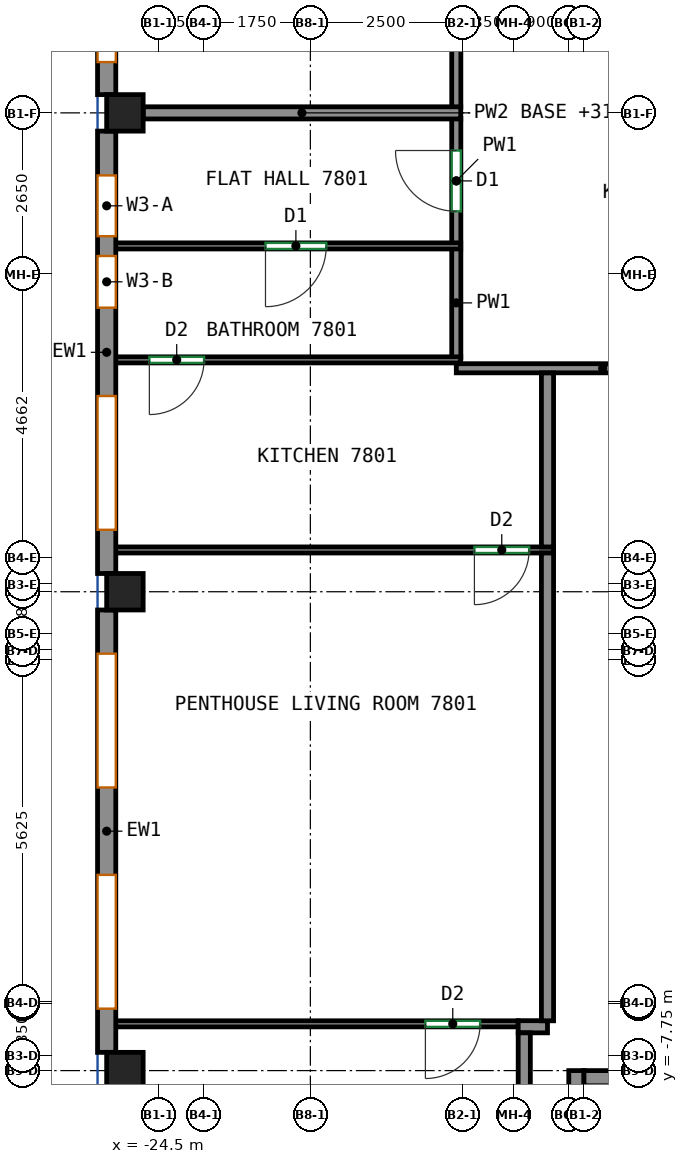
"""IFC4 building model, lengths in metres.
Left out: names, types, materials, properties, quantities, classifications, styles, units other than length and angle.
Written with IfcOpenShell. Run it as: python <this file> out.ifc"""

import sys

from ifc_helpers import new_model, si_unit, direction, frame, frame_2d, origin, origin_2d, place, context, subcontext, project, spatial, rectangle, extrude, source, transform, mapped, element, fill, save


model = new_model("IFC4")
c1 = context("Model", 3, precision=1e-05, world=origin(), true_north=direction((0.0, 1.0)))
c2 = subcontext(c1, "Body", "Model", "MODEL_VIEW")
j1 = project(units=[si_unit("LENGTHUNIT", "METRE"), si_unit("PLANEANGLEUNIT", "RADIAN")], contexts=[c1])
p1 = place(None, origin())
s1 = spatial("IfcSite", under=j1, at=p1, CompositionType="ELEMENT")
p2 = place(p1, origin())
s2 = spatial("IfcBuilding", under=s1, at=p2, CompositionType="ELEMENT")
p3 = place(p2, frame((0.0, 0.0, 312.0)))
s3 = spatial("IfcBuildingStorey", under=s2, at=p3, CompositionType="ELEMENT", Elevation=312.0)
m1 = source(origin(), c2, "Body", "SweptSolid", [
    extrude(rectangle(XDim=0.6, YDim=0.6, at=origin_2d()), origin(), (0.0, 0.0, 1.0), 3.12),
])
for number, where, z_axis, x_axis in (
    (1, (-25.05, -7.75, 0.0), (0.0, 0.0, 1.0), (1.0, 0.0, 0.0)),
    (2, (-25.05, 0.125, 0.0), (0.0, 0.0, 1.0), (1.0, 0.0, 0.0)),
    (3, (-25.05, 8.0, 0.0), (0.0, 0.0, 1.0), (1.0, 0.0, 0.0)),
):
    element("IfcColumn", number, at=place(p3, frame(where, z_axis=z_axis, x_axis=x_axis)), inside=s3, PredefinedType="COLUMN", context=c2, shape_type="MappedRepresentation", body=[
        mapped(m1, transform((0.0, 0.0, 0.0))),
    ])
m2 = source(origin(), c2, "Body", "SweptSolid", [
    extrude(rectangle(XDim=8.0, YDim=0.25, at=frame_2d((4.0, 0.0))), origin(), (0.0, 0.0, 1.0), 3.12),
])
p4 = place(p3, frame((-17.625, -15.75, 0.0), z_axis=(0.0, 0.0, 1.0), x_axis=(0.0, 1.0, 0.0)))
e4 = element("IfcWall", 4, at=p4, inside=s3, PredefinedType="SHEAR", context=c2, shape_type="MappedRepresentation", body=[
    mapped(m2, transform((0.0, 0.0, 0.0))),
])
m3 = source(origin(), c2, "Body", "SweptSolid", [
    extrude(rectangle(XDim=3.7, YDim=0.25, at=frame_2d((1.85, 0.0))), origin(), (0.0, 0.0, 1.0), 3.12),
])
p5 = place(p3, frame((-17.5, -7.875, 0.0), z_axis=(0.0, 0.0, 1.0), x_axis=(1.0, 0.0, 0.0)))
e5 = element("IfcWall", 5, at=p5, inside=s3, PredefinedType="SHEAR", context=c2, shape_type="MappedRepresentation", body=[
    mapped(m3, transform((0.0, 0.0, 0.0))),
])
m4 = source(origin(), c2, "Body", "SweptSolid", [
    extrude(rectangle(XDim=13.082, YDim=0.3, at=frame_2d((6.541, 0.0))), origin(), (0.0, 0.0, 1.0), 3.12),
])
p6 = place(p3, frame((-25.35, 21.382, 0.0), z_axis=(0.0, 0.0, 1.0), x_axis=(0.0, -1.0, 0.0)))
e6 = element("IfcWall", 6, at=p6, inside=s3, PredefinedType="SOLIDWALL", context=c2, shape_type="MappedRepresentation", body=[
    mapped(m4, transform((0.0, 0.0, 0.0))),
])
p7 = place(p6, frame((0.535, 0.0, 0.8)))
e7 = element("IfcOpeningElement", 7, at=p7, cuts=e6, PredefinedType="OPENING", context=c2, shape_type="SweptSolid", body=[
    extrude(rectangle(XDim=2.2, YDim=2.05, at=frame_2d((1.1, 1.025))), frame((0.0, 0.16, 0.0), z_axis=(0.0, -1.0, 0.0), x_axis=(1.0, 0.0, 0.0)), (0.0, 0.0, 1.0), 0.32),
])
p8 = place(p6, frame((3.806, 0.0, 0.8)))
e8 = element("IfcOpeningElement", 8, at=p8, cuts=e6, PredefinedType="OPENING", context=c2, shape_type="SweptSolid", body=[
    extrude(rectangle(XDim=2.2, YDim=2.05, at=frame_2d((1.1, 1.025))), frame((0.0, 0.16, 0.0), z_axis=(0.0, -1.0, 0.0), x_axis=(1.0, 0.0, 0.0)), (0.0, 0.0, 1.0), 0.32),
])
p9 = place(p6, frame((7.076, 0.0, 0.8)))
e9 = element("IfcOpeningElement", 9, at=p9, cuts=e6, PredefinedType="OPENING", context=c2, shape_type="SweptSolid", body=[
    extrude(rectangle(XDim=2.2, YDim=2.05, at=frame_2d((1.1, 1.025))), frame((0.0, 0.16, 0.0), z_axis=(0.0, -1.0, 0.0), x_axis=(1.0, 0.0, 0.0)), (0.0, 0.0, 1.0), 0.32),
])
p10 = place(p6, frame((10.347, 0.0, 0.8)))
e10 = element("IfcOpeningElement", 10, at=p10, cuts=e6, PredefinedType="OPENING", context=c2, shape_type="SweptSolid", body=[
    extrude(rectangle(XDim=2.2, YDim=2.05, at=frame_2d((1.1, 1.025))), frame((0.0, 0.16, 0.0), z_axis=(0.0, -1.0, 0.0), x_axis=(1.0, 0.0, 0.0)), (0.0, 0.0, 1.0), 0.32),
])
m5 = source(origin(), c2, "Body", "SweptSolid", [
    extrude(rectangle(XDim=7.275, YDim=0.3, at=frame_2d((3.637, 0.0))), origin(), (0.0, 0.0, 1.0), 3.12),
])
p11 = place(p3, frame((-25.35, 7.7, 0.0), z_axis=(0.0, 0.0, 1.0), x_axis=(0.0, -1.0, 0.0)))
e11 = element("IfcWall", 11, at=p11, inside=s3, PredefinedType="SOLIDWALL", context=c2, shape_type="MappedRepresentation", body=[
    mapped(m5, transform((0.0, 0.0, 0.0))),
])
p12 = place(p11, frame((0.728, 0.0, 0.8)))
e12 = element("IfcOpeningElement", 12, at=p12, cuts=e11, PredefinedType="OPENING", context=c2, shape_type="SweptSolid", body=[
    extrude(rectangle(XDim=1.0, YDim=2.05, at=frame_2d((0.5, 1.025))), frame((0.0, 0.16, 0.0), z_axis=(0.0, -1.0, 0.0), x_axis=(1.0, 0.0, 0.0)), (0.0, 0.0, 1.0), 0.32),
])
p13 = place(p11, frame((4.356, 0.0, 0.8)))
e13 = element("IfcOpeningElement", 13, at=p13, cuts=e11, PredefinedType="OPENING", context=c2, shape_type="SweptSolid", body=[
    extrude(rectangle(XDim=2.2, YDim=2.05, at=frame_2d((1.1, 1.025))), frame((0.0, 0.16, 0.0), z_axis=(0.0, -1.0, 0.0), x_axis=(1.0, 0.0, 0.0)), (0.0, 0.0, 1.0), 0.32),
])
p14 = place(p11, frame((2.053, 0.0, 0.8)))
e14 = element("IfcOpeningElement", 14, at=p14, cuts=e11, PredefinedType="OPENING", context=c2, shape_type="SweptSolid", body=[
    extrude(rectangle(XDim=0.85, YDim=2.05, at=frame_2d((0.425, 1.025))), frame((0.0, 0.16, 0.0), z_axis=(0.0, -1.0, 0.0), x_axis=(1.0, 0.0, 0.0)), (0.0, 0.0, 1.0), 0.32),
])
p15 = place(p3, frame((-25.35, -0.175, 0.0), z_axis=(0.0, 0.0, 1.0), x_axis=(0.0, -1.0, 0.0)))
e15 = element("IfcWall", 15, at=p15, inside=s3, PredefinedType="SOLIDWALL", context=c2, shape_type="MappedRepresentation", body=[
    mapped(m5, transform((0.0, 0.0, 0.0))),
])
p16 = place(p15, frame((0.719, 0.0, 0.8)))
e16 = element("IfcOpeningElement", 16, at=p16, cuts=e15, PredefinedType="OPENING", context=c2, shape_type="SweptSolid", body=[
    extrude(rectangle(XDim=2.2, YDim=2.05, at=frame_2d((1.1, 1.025))), frame((0.0, 0.16, 0.0), z_axis=(0.0, -1.0, 0.0), x_axis=(1.0, 0.0, 0.0)), (0.0, 0.0, 1.0), 0.32),
])
p17 = place(p15, frame((4.356, 0.0, 0.8)))
e17 = element("IfcOpeningElement", 17, at=p17, cuts=e15, PredefinedType="OPENING", context=c2, shape_type="SweptSolid", body=[
    extrude(rectangle(XDim=2.2, YDim=2.05, at=frame_2d((1.1, 1.025))), frame((0.0, 0.16, 0.0), z_axis=(0.0, -1.0, 0.0), x_axis=(1.0, 0.0, 0.0)), (0.0, 0.0, 1.0), 0.32),
])
p18 = place(p3, frame((-19.6, 3.8, 0.0), z_axis=(0.0, 0.0, 1.0), x_axis=(1.0, 0.0, 0.0)))
e18 = element("IfcWall", 18, at=p18, inside=s3, PredefinedType="PARTITIONING", context=c2, shape_type="SweptSolid", body=[
    extrude(rectangle(XDim=4.815, YDim=0.15, at=frame_2d((2.408, 0.0))), origin(), (0.0, 0.0, 1.0), 3.12),
])
p19 = place(p3, frame((-19.6, 3.978, 0.0), z_axis=(0.0, 0.0, 1.0), x_axis=(0.0, 1.0, 0.0)))
e19 = element("IfcWall", 19, at=p19, inside=s3, PredefinedType="PARTITIONING", context=c2, shape_type="SweptSolid", body=[
    extrude(rectangle(XDim=1.794, YDim=0.15, at=frame_2d((0.897, 0.0))), origin(), (0.0, 0.0, 1.0), 3.12),
])
p20 = place(p3, frame((-19.6, 5.852, 0.0), z_axis=(0.0, 0.0, 1.0), x_axis=(0.0, 1.0, 0.0)))
e20 = element("IfcWall", 20, at=p20, inside=s3, PredefinedType="PARTITIONING", context=c2, shape_type="SweptSolid", body=[
    extrude(rectangle(XDim=2.058, YDim=0.15, at=frame_2d((1.029, 0.0))), origin(), (0.0, 0.0, 1.0), 3.12),
])
p21 = place(p20, frame((0.529, 0.0, 0.0)))
e21 = element("IfcOpeningElement", 21, at=p21, cuts=e20, PredefinedType="OPENING", context=c2, shape_type="SweptSolid", body=[
    extrude(rectangle(XDim=1.0, YDim=2.1, at=frame_2d((0.5, 1.05))), frame((0.0, 0.085, 0.0), z_axis=(0.0, -1.0, 0.0), x_axis=(1.0, 0.0, 0.0)), (0.0, 0.0, 1.0), 0.17),
])
p22 = place(p3, frame((-19.6, 8.09, 0.0), z_axis=(0.0, 0.0, 1.0), x_axis=(0.0, 1.0, 0.0)))
e22 = element("IfcWall", 22, at=p22, inside=s3, PredefinedType="PARTITIONING", context=c2, shape_type="SweptSolid", body=[
    extrude(rectangle(XDim=15.635, YDim=0.15, at=frame_2d((7.817, 0.0))), origin(), (0.0, 0.0, 1.0), 3.12),
])
p23 = place(p3, frame((-18.582, -6.981, 0.0), z_axis=(0.0, 0.0, 1.0), x_axis=(-1.0, 0.0, 0.0)))
e23 = element("IfcWall", 23, at=p23, inside=s3, PredefinedType="PARTITIONING", context=c2, shape_type="SweptSolid", body=[
    extrude(rectangle(XDim=6.668, YDim=0.1, at=frame_2d((3.334, 0.0))), origin(), (0.0, 0.0, 1.0), 3.12),
])
p24 = place(p23, frame((0.626, 0.0, 0.0)))
e24 = element("IfcOpeningElement", 24, at=p24, cuts=e23, PredefinedType="OPENING", context=c2, shape_type="SweptSolid", body=[
    extrude(rectangle(XDim=0.9, YDim=2.1, at=frame_2d((0.45, 1.05))), frame((0.0, 0.06, 0.0), z_axis=(0.0, -1.0, 0.0), x_axis=(1.0, 0.0, 0.0)), (0.0, 0.0, 1.0), 0.12),
])
p25 = place(p3, frame((-18.582, -7.029, 0.0), z_axis=(0.0, 0.0, 1.0), x_axis=(1.0, 0.0, 0.0)))
e25 = element("IfcWall", 25, at=p25, inside=s3, PredefinedType="PARTITIONING", context=c2, shape_type="SweptSolid", body=[
    extrude(rectangle(XDim=0.482, YDim=0.2, at=frame_2d((0.241, 0.0))), origin(), (0.0, 0.0, 1.0), 3.12),
])
p26 = place(p3, frame((-18.482, -9.902, 0.0), z_axis=(0.0, 0.0, 1.0), x_axis=(0.0, 1.0, 0.0)))
e26 = element("IfcWall", 26, at=p26, inside=s3, PredefinedType="PARTITIONING", context=c2, shape_type="SweptSolid", body=[
    extrude(rectangle(XDim=2.773, YDim=0.2, at=frame_2d((1.387, 0.0))), origin(), (0.0, 0.0, 1.0), 3.12),
])
p27 = place(p3, frame((-18.0, 0.812, 0.0), z_axis=(0.0, 0.0, 1.0), x_axis=(-1.0, 0.0, 0.0)))
e27 = element("IfcWall", 27, at=p27, inside=s3, PredefinedType="PARTITIONING", context=c2, shape_type="SweptSolid", body=[
    extrude(rectangle(XDim=7.25, YDim=0.1, at=frame_2d((3.625, 0.0))), origin(), (0.0, 0.0, 1.0), 3.12),
])
p28 = place(p27, frame((0.402, 0.0, 0.0)))
e28 = element("IfcOpeningElement", 28, at=p28, cuts=e27, PredefinedType="OPENING", context=c2, shape_type="SweptSolid", body=[
    extrude(rectangle(XDim=0.9, YDim=2.1, at=frame_2d((0.45, 1.05))), frame((0.0, 0.06, 0.0), z_axis=(0.0, -1.0, 0.0), x_axis=(1.0, 0.0, 0.0)), (0.0, 0.0, 1.0), 0.12),
])
p29 = place(p3, frame((-18.1, -6.931, 0.0), z_axis=(0.0, 0.0, 1.0), x_axis=(0.0, 1.0, 0.0)))
e29 = element("IfcWall", 29, at=p29, inside=s3, PredefinedType="PARTITIONING", context=c2, shape_type="SweptSolid", body=[
    extrude(rectangle(XDim=7.693, YDim=0.2, at=frame_2d((3.846, 0.0))), origin(), (0.0, 0.0, 1.0), 3.12),
])
p30 = place(p3, frame((-19.527, 3.938, 0.0), z_axis=(0.0, 0.0, 1.0), x_axis=(-1.0, 0.0, 0.0)))
e30 = element("IfcWall", 30, at=p30, inside=s3, PredefinedType="PARTITIONING", context=c2, shape_type="SweptSolid", body=[
    extrude(rectangle(XDim=5.723, YDim=0.1, at=frame_2d((2.861, 0.0))), origin(), (0.0, 0.0, 1.0), 3.12),
])
p31 = place(p30, frame((4.221, 0.0, 0.0)))
e31 = element("IfcOpeningElement", 31, at=p31, cuts=e30, PredefinedType="OPENING", context=c2, shape_type="SweptSolid", body=[
    extrude(rectangle(XDim=0.9, YDim=2.1, at=frame_2d((0.45, 1.05))), frame((0.0, 0.06, 0.0), z_axis=(0.0, -1.0, 0.0), x_axis=(1.0, 0.0, 0.0)), (0.0, 0.0, 1.0), 0.12),
])
p32 = place(p3, frame((-18.1, 0.862, 0.0), z_axis=(0.0, 0.0, 1.0), x_axis=(0.0, 1.0, 0.0)))
e32 = element("IfcWall", 32, at=p32, inside=s3, PredefinedType="PARTITIONING", context=c2, shape_type="SweptSolid", body=[
    extrude(rectangle(XDim=2.861, YDim=0.2, at=frame_2d((1.43, 0.0))), origin(), (0.0, 0.0, 1.0), 3.12),
])
p33 = place(p3, frame((-19.527, 5.812, 0.0), z_axis=(0.0, 0.0, 1.0), x_axis=(-1.0, 0.0, 0.0)))
e33 = element("IfcWall", 33, at=p33, inside=s3, PredefinedType="PARTITIONING", context=c2, shape_type="SweptSolid", body=[
    extrude(rectangle(XDim=5.723, YDim=0.1, at=frame_2d((2.861, 0.0))), origin(), (0.0, 0.0, 1.0), 3.12),
])
p34 = place(p33, frame((2.211, 0.0, 0.0)))
e34 = element("IfcOpeningElement", 34, at=p34, cuts=e33, PredefinedType="OPENING", context=c2, shape_type="SweptSolid", body=[
    extrude(rectangle(XDim=1.0, YDim=2.1, at=frame_2d((0.5, 1.05))), frame((0.0, 0.06, 0.0), z_axis=(0.0, -1.0, 0.0), x_axis=(1.0, 0.0, 0.0)), (0.0, 0.0, 1.0), 0.12),
])
p35 = place(p3, frame((-19.527, 8.0, 0.0), z_axis=(0.0, 0.0, 1.0), x_axis=(-1.0, 0.0, 0.0)))
e35 = element("IfcWall", 35, at=p35, inside=s3, PredefinedType="PARTITIONING", context=c2, shape_type="SweptSolid", body=[
    extrude(rectangle(XDim=5.223, YDim=0.2, at=frame_2d((2.611, 0.0))), origin(), (0.0, 0.0, 1.0), 2.57),
])
p36 = place(p10, origin())
e36 = element("IfcWindow", 36, at=p36, inside=s3, PartitioningType="SINGLE_PANEL", PredefinedType="WINDOW", context=c2, shape_type="SweptSolid", body=[
    extrude(rectangle(XDim=2.2, YDim=2.05, at=frame_2d((1.1, 1.025))), frame((0.0, 0.03, 0.0), z_axis=(0.0, -1.0, 0.0), x_axis=(1.0, 0.0, 0.0)), (0.0, 0.0, 1.0), 0.06),
])
fill(e10, e36)
p37 = place(p12, origin())
e37 = element("IfcWindow", 37, at=p37, inside=s3, PartitioningType="SINGLE_PANEL", PredefinedType="WINDOW", context=c2, shape_type="SweptSolid", body=[
    extrude(rectangle(XDim=1.0, YDim=2.05, at=frame_2d((0.5, 1.025))), frame((0.0, 0.03, 0.0), z_axis=(0.0, -1.0, 0.0), x_axis=(1.0, 0.0, 0.0)), (0.0, 0.0, 1.0), 0.06),
])
fill(e12, e37)
p38 = place(p13, origin())
e38 = element("IfcWindow", 38, at=p38, inside=s3, PartitioningType="SINGLE_PANEL", PredefinedType="WINDOW", context=c2, shape_type="SweptSolid", body=[
    extrude(rectangle(XDim=2.2, YDim=2.05, at=frame_2d((1.1, 1.025))), frame((0.0, 0.03, 0.0), z_axis=(0.0, -1.0, 0.0), x_axis=(1.0, 0.0, 0.0)), (0.0, 0.0, 1.0), 0.06),
])
fill(e13, e38)
p39 = place(p16, origin())
e39 = element("IfcWindow", 39, at=p39, inside=s3, PartitioningType="SINGLE_PANEL", PredefinedType="WINDOW", context=c2, shape_type="SweptSolid", body=[
    extrude(rectangle(XDim=2.2, YDim=2.05, at=frame_2d((1.1, 1.025))), frame((0.0, 0.03, 0.0), z_axis=(0.0, -1.0, 0.0), x_axis=(1.0, 0.0, 0.0)), (0.0, 0.0, 1.0), 0.06),
])
fill(e16, e39)
p40 = place(p17, origin())
e40 = element("IfcWindow", 40, at=p40, inside=s3, PartitioningType="SINGLE_PANEL", PredefinedType="WINDOW", context=c2, shape_type="SweptSolid", body=[
    extrude(rectangle(XDim=2.2, YDim=2.05, at=frame_2d((1.1, 1.025))), frame((0.0, 0.03, 0.0), z_axis=(0.0, -1.0, 0.0), x_axis=(1.0, 0.0, 0.0)), (0.0, 0.0, 1.0), 0.06),
])
fill(e17, e40)
p41 = place(p24, origin())
e41 = element("IfcDoor", 41, at=p41, inside=s3, OperationType="SINGLE_SWING_RIGHT", PredefinedType="DOOR", context=c2, shape_type="SweptSolid", body=[
    extrude(rectangle(XDim=0.9, YDim=2.1, at=frame_2d((0.45, 1.05))), frame((0.0, 0.025, 0.0), z_axis=(0.0, -1.0, 0.0), x_axis=(1.0, 0.0, 0.0)), (0.0, 0.0, 1.0), 0.05),
])
fill(e24, e41)
p42 = place(p28, origin())
e42 = element("IfcDoor", 42, at=p42, inside=s3, OperationType="SINGLE_SWING_RIGHT", PredefinedType="DOOR", context=c2, shape_type="SweptSolid", body=[
    extrude(rectangle(XDim=0.9, YDim=2.1, at=frame_2d((0.45, 1.05))), frame((0.0, 0.025, 0.0), z_axis=(0.0, -1.0, 0.0), x_axis=(1.0, 0.0, 0.0)), (0.0, 0.0, 1.0), 0.05),
])
fill(e28, e42)
p43 = place(p31, origin())
e43 = element("IfcDoor", 43, at=p43, inside=s3, OperationType="SINGLE_SWING_RIGHT", PredefinedType="DOOR", context=c2, shape_type="SweptSolid", body=[
    extrude(rectangle(XDim=0.9, YDim=2.1, at=frame_2d((0.45, 1.05))), frame((0.0, 0.025, 0.0), z_axis=(0.0, -1.0, 0.0), x_axis=(1.0, 0.0, 0.0)), (0.0, 0.0, 1.0), 0.05),
])
fill(e31, e43)
p44 = place(p34, origin())
e44 = element("IfcDoor", 44, at=p44, inside=s3, OperationType="SINGLE_SWING_RIGHT", PredefinedType="DOOR", context=c2, shape_type="SweptSolid", body=[
    extrude(rectangle(XDim=1.0, YDim=2.1, at=frame_2d((0.5, 1.05))), frame((0.0, 0.025, 0.0), z_axis=(0.0, -1.0, 0.0), x_axis=(1.0, 0.0, 0.0)), (0.0, 0.0, 1.0), 0.05),
])
fill(e34, e44)
p45 = place(p21, origin())
e45 = element("IfcDoor", 45, at=p45, inside=s3, OperationType="SINGLE_SWING_RIGHT", PredefinedType="DOOR", context=c2, shape_type="SweptSolid", body=[
    extrude(rectangle(XDim=1.0, YDim=2.1, at=frame_2d((0.5, 1.05))), frame((0.0, 0.025, 0.0), z_axis=(0.0, -1.0, 0.0), x_axis=(1.0, 0.0, 0.0)), (0.0, 0.0, 1.0), 0.05),
])
fill(e21, e45)
p46 = place(p14, origin())
e46 = element("IfcWindow", 46, at=p46, inside=s3, PartitioningType="SINGLE_PANEL", PredefinedType="WINDOW", context=c2, shape_type="SweptSolid", body=[
    extrude(rectangle(XDim=0.85, YDim=2.05, at=frame_2d((0.425, 1.025))), frame((0.0, 0.03, 0.0), z_axis=(0.0, -1.0, 0.0), x_axis=(1.0, 0.0, 0.0)), (0.0, 0.0, 1.0), 0.06),
])
fill(e14, e46)
save(model, sys.argv[1])
